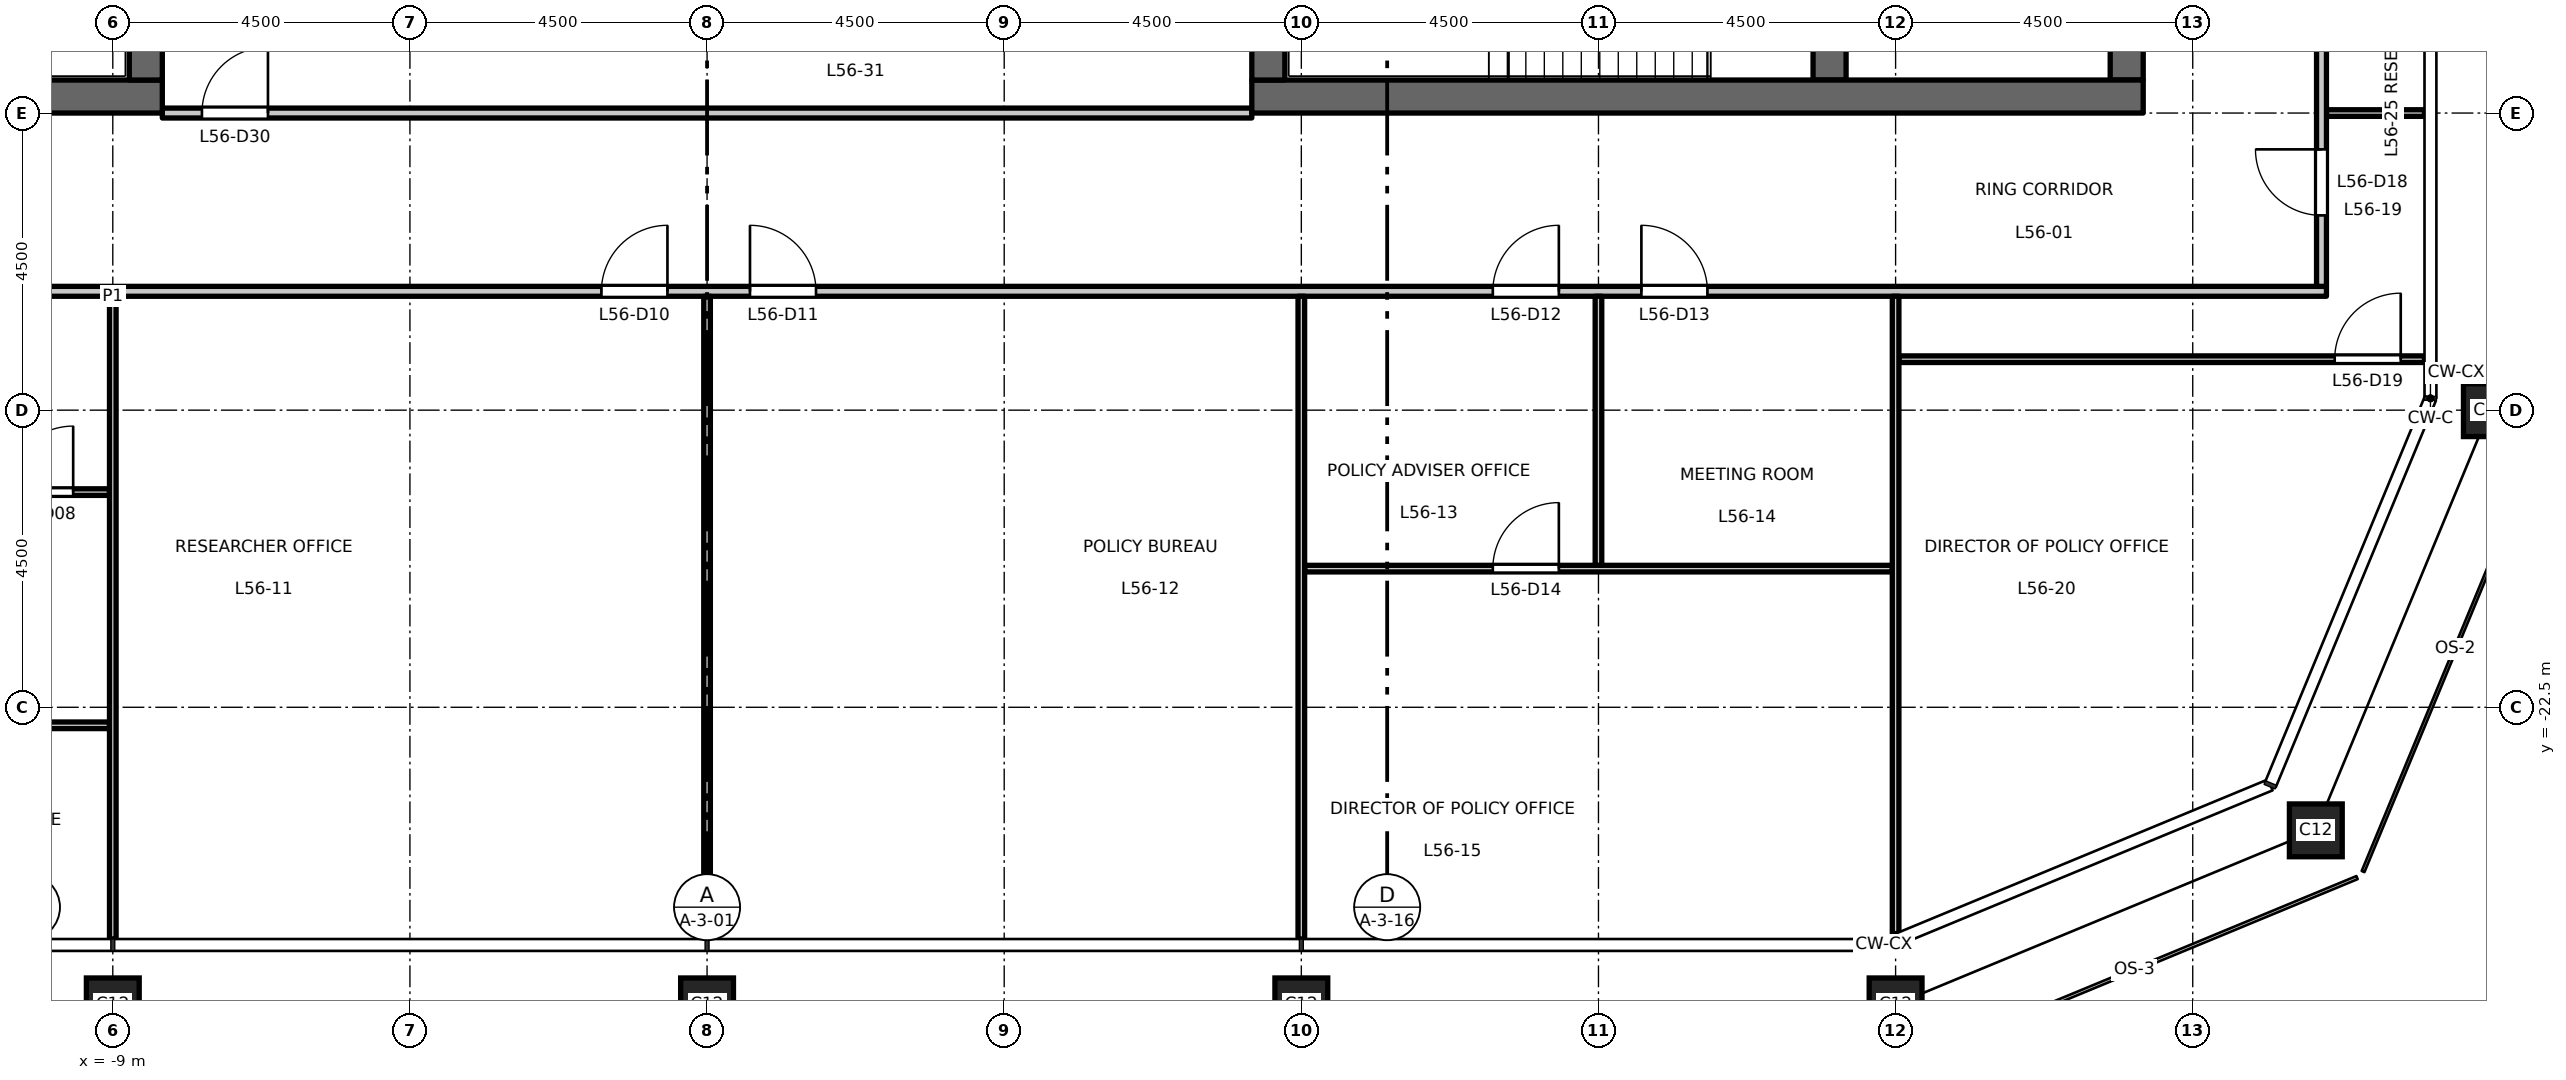
"""IFC4 building model, lengths in metres.
Left out: names, types, materials, properties, quantities, classifications, styles, units other than length and angle.
Written with IfcOpenShell. Run it as: python <this file> out.ifc"""

import sys

from ifc_helpers import new_model, si_unit, direction, frame, frame_2d, origin, origin_2d, place, context, subcontext, project, spatial, rectangle, hollow_rectangle, extrude, element, fill, save


model = new_model("IFC4")
c1 = context("Model", 3, precision=1e-05, world=origin(), true_north=direction((0.0, 1.0)))
c2 = subcontext(c1, "Body", "Model", "MODEL_VIEW")
j1 = project(units=[si_unit("LENGTHUNIT", "METRE"), si_unit("PLANEANGLEUNIT", "RADIAN")], contexts=[c1])
p1 = place(None, origin())
s1 = spatial("IfcSite", under=j1, at=p1, CompositionType="ELEMENT")
p2 = place(p1, origin())
s2 = spatial("IfcBuilding", under=s1, at=p2, CompositionType="ELEMENT")
p3 = place(p2, frame((0.0, 0.0, 260.2)))
s3 = spatial("IfcBuildingStorey", under=s2, at=p3, CompositionType="ELEMENT", Elevation=260.2)
for number, where, z_axis, x_axis in (
    (1, (-9.0, -27.0, 0.0), (0.0, 0.0, 1.0), (1.0, 0.0, 0.0)),
    (2, (0.0, -27.0, 0.0), (0.0, 0.0, 1.0), (1.0, 0.0, 0.0)),
    (3, (9.0, -27.0, 0.0), (0.0, 0.0, 1.0), (1.0, 0.0, 0.0)),
    (4, (18.0, -27.0, 0.0), (0.0, 0.0, 1.0), (1.0, 0.0, 0.0)),
    (5, (24.364, -24.364, 0.0), (0.0, 0.0, 1.0), (1.0, 0.0, 0.0)),
    (6, (27.0, -18.0, 0.0), (0.0, 0.0, 1.0), (1.0, 0.0, 0.0)),
):
    element("IfcColumn", number, at=place(p3, frame(where, z_axis=z_axis, x_axis=x_axis)), inside=s3, PredefinedType="COLUMN", context=c2, shape_type="SweptSolid", body=[
        extrude(hollow_rectangle(XDim=0.8, YDim=0.8, WallThickness=0.045, at=origin_2d()), origin(), (0.0, 0.0, 1.0), 4.5),
    ])
p4 = place(p3, frame((-8.25, -13.25, 0.0), z_axis=(0.0, 0.0, 1.0), x_axis=(-1.0, 0.0, 0.0)))
e7 = element("IfcWall", 7, at=p4, inside=s3, PredefinedType="SHEAR", context=c2, shape_type="SweptSolid", body=[
    extrude(rectangle(XDim=13.5, YDim=0.5, at=frame_2d((6.75, 0.0))), origin(), (0.0, 0.0, 1.0), 4.35),
])
p5 = place(p3, frame((-8.5, -13.0, 0.0), z_axis=(0.0, 0.0, 1.0), x_axis=(0.0, 1.0, 0.0)))
e8 = element("IfcWall", 8, at=p5, inside=s3, PredefinedType="SHEAR", context=c2, shape_type="SweptSolid", body=[
    extrude(rectangle(XDim=26.0, YDim=0.5, at=frame_2d((13.0, 0.0))), origin(), (0.0, 0.0, 1.0), 4.35),
])
p6 = place(p3, frame((21.5, -13.0, 0.0), z_axis=(0.0, 0.0, 1.0), x_axis=(0.0, 1.0, 0.0)))
e9 = element("IfcWall", 9, at=p6, inside=s3, PredefinedType="SHEAR", context=c2, shape_type="SweptSolid", body=[
    extrude(rectangle(XDim=26.0, YDim=0.5, at=frame_2d((13.0, 0.0))), origin(), (0.0, 0.0, 1.0), 4.35),
])
p7 = place(p6, frame((16.825, 0.0, 0.0)))
e10 = element("IfcOpeningElement", 10, at=p7, cuts=e9, PredefinedType="OPENING", context=c2, shape_type="SweptSolid", body=[
    extrude(rectangle(XDim=1.8, YDim=2.1, at=frame_2d((0.9, 1.05))), frame((0.0, 0.26, 0.0), z_axis=(0.0, -1.0, 0.0), x_axis=(1.0, 0.0, 0.0)), (0.0, 0.0, 1.0), 0.52),
])
p8 = place(p6, frame((7.375, 0.0, 0.0)))
e11 = element("IfcOpeningElement", 11, at=p8, cuts=e9, PredefinedType="OPENING", context=c2, shape_type="SweptSolid", body=[
    extrude(rectangle(XDim=1.8, YDim=2.1, at=frame_2d((0.9, 1.05))), frame((0.0, 0.26, 0.0), z_axis=(0.0, -1.0, 0.0), x_axis=(1.0, 0.0, 0.0)), (0.0, 0.0, 1.0), 0.52),
])
p9 = place(p6, frame((14.125, 0.0, 0.0)))
e12 = element("IfcOpeningElement", 12, at=p9, cuts=e9, PredefinedType="OPENING", context=c2, shape_type="SweptSolid", body=[
    extrude(rectangle(XDim=0.9, YDim=2.1, at=frame_2d((0.45, 1.05))), frame((0.0, 0.26, 0.0), z_axis=(0.0, -1.0, 0.0), x_axis=(1.0, 0.0, 0.0)), (0.0, 0.0, 1.0), 0.52),
])
p10 = place(p3, frame((17.0, -13.0, 0.0), z_axis=(0.0, 0.0, 1.0), x_axis=(0.0, 1.0, 0.0)))
e13 = element("IfcWall", 13, at=p10, inside=s3, PredefinedType="SHEAR", context=c2, shape_type="SweptSolid", body=[
    extrude(rectangle(XDim=6.575, YDim=0.5, at=frame_2d((3.288, 0.0))), origin(), (0.0, 0.0, 1.0), 4.35),
])
p11 = place(p3, frame((8.25, -13.25, 0.0), z_axis=(0.0, 0.0, 1.0), x_axis=(1.0, 0.0, 0.0)))
e14 = element("IfcWall", 14, at=p11, inside=s3, PredefinedType="SHEAR", context=c2, shape_type="SweptSolid", body=[
    extrude(rectangle(XDim=13.5, YDim=0.5, at=frame_2d((6.75, 0.0))), origin(), (0.0, 0.0, 1.0), 4.35),
])
p12 = place(p3, frame((8.5, -13.0, 0.0), z_axis=(0.0, 0.0, 1.0), x_axis=(0.0, 1.0, 0.0)))
e15 = element("IfcWall", 15, at=p12, inside=s3, PredefinedType="SHEAR", context=c2, shape_type="SweptSolid", body=[
    extrude(rectangle(XDim=26.0, YDim=0.5, at=frame_2d((13.0, 0.0))), origin(), (0.0, 0.0, 1.0), 4.35),
])
p13 = place(p3, frame((-17.95, -22.773, 0.0), z_axis=(0.0, 0.0, 1.0), x_axis=(1.0, 0.0, 0.0)))
e16 = element("IfcWall", 16, at=p13, inside=s3, PredefinedType="PARTITIONING", context=c2, shape_type="SweptSolid", body=[
    extrude(rectangle(XDim=8.9, YDim=0.1, at=frame_2d((4.45, 0.0))), origin(), (0.0, 0.0, 1.0), 4.35),
])
p14 = place(p13, frame((0.6, 0.0, 0.0)))
e17 = element("IfcOpeningElement", 17, at=p14, cuts=e16, PredefinedType="OPENING", context=c2, shape_type="SweptSolid", body=[
    extrude(rectangle(XDim=1.0, YDim=2.1, at=frame_2d((0.5, 1.05))), frame((0.0, 0.06, 0.0), z_axis=(0.0, -1.0, 0.0), x_axis=(1.0, 0.0, 0.0)), (0.0, 0.0, 1.0), 0.12),
])
p15 = place(p3, frame((9.05, -20.4, 0.0), z_axis=(0.0, 0.0, 1.0), x_axis=(1.0, 0.0, 0.0)))
e18 = element("IfcWall", 18, at=p15, inside=s3, PredefinedType="PARTITIONING", context=c2, shape_type="SweptSolid", body=[
    extrude(rectangle(XDim=8.9, YDim=0.1, at=frame_2d((4.45, 0.0))), origin(), (0.0, 0.0, 1.0), 4.35),
])
p16 = place(p15, frame((2.85, 0.0, 0.0)))
e19 = element("IfcOpeningElement", 19, at=p16, cuts=e18, PredefinedType="OPENING", context=c2, shape_type="SweptSolid", body=[
    extrude(rectangle(XDim=1.0, YDim=2.1, at=frame_2d((0.5, 1.05))), frame((0.0, 0.06, 0.0), z_axis=(0.0, -1.0, 0.0), x_axis=(1.0, 0.0, 0.0)), (0.0, 0.0, 1.0), 0.12),
])
p17 = place(p3, frame((-17.95, -19.241, 0.0), z_axis=(0.0, 0.0, 1.0), x_axis=(1.0, 0.0, 0.0)))
e20 = element("IfcWall", 20, at=p17, inside=s3, PredefinedType="PARTITIONING", context=c2, shape_type="SweptSolid", body=[
    extrude(rectangle(XDim=8.9, YDim=0.1, at=frame_2d((4.45, 0.0))), origin(), (0.0, 0.0, 1.0), 4.35),
])
p18 = place(p17, frame((7.35, 0.0, 0.0)))
e21 = element("IfcOpeningElement", 21, at=p18, cuts=e20, PredefinedType="OPENING", context=c2, shape_type="SweptSolid", body=[
    extrude(rectangle(XDim=1.0, YDim=2.1, at=frame_2d((0.5, 1.05))), frame((0.0, 0.06, 0.0), z_axis=(0.0, -1.0, 0.0), x_axis=(1.0, 0.0, 0.0)), (0.0, 0.0, 1.0), 0.12),
])
p19 = place(p3, frame((18.05, -17.228, 0.0), z_axis=(0.0, 0.0, 1.0), x_axis=(1.0, 0.0, 0.0)))
e22 = element("IfcWall", 22, at=p19, inside=s3, PredefinedType="PARTITIONING", context=c2, shape_type="SweptSolid", body=[
    extrude(rectangle(XDim=7.96, YDim=0.1, at=frame_2d((3.98, 0.0))), origin(), (0.0, 0.0, 1.0), 4.35),
])
p20 = place(p19, frame((6.6, 0.0, 0.0)))
e23 = element("IfcOpeningElement", 23, at=p20, cuts=e22, PredefinedType="OPENING", context=c2, shape_type="SweptSolid", body=[
    extrude(rectangle(XDim=1.0, YDim=2.1, at=frame_2d((0.5, 1.05))), frame((0.0, 0.06, 0.0), z_axis=(0.0, -1.0, 0.0), x_axis=(1.0, 0.0, 0.0)), (0.0, 0.0, 1.0), 0.12),
])
p21 = place(p3, frame((-24.525, -16.2, 0.0), z_axis=(0.0, 0.0, 1.0), x_axis=(1.0, 0.0, 0.0)))
e24 = element("IfcWall", 24, at=p21, inside=s3, PredefinedType="PARTITIONING", context=c2, shape_type="SweptSolid", body=[
    extrude(rectangle(XDim=49.05, YDim=0.15, at=frame_2d((24.525, 0.0))), origin(), (0.0, 0.0, 1.0), 4.35),
])
p22 = place(p21, frame((7.175, 0.0, 0.0)))
e25 = element("IfcOpeningElement", 25, at=p22, cuts=e24, PredefinedType="OPENING", context=c2, shape_type="SweptSolid", body=[
    extrude(rectangle(XDim=1.0, YDim=2.1, at=frame_2d((0.5, 1.05))), frame((0.0, 0.085, 0.0), z_axis=(0.0, -1.0, 0.0), x_axis=(1.0, 0.0, 0.0)), (0.0, 0.0, 1.0), 0.17),
])
p23 = place(p21, frame((22.925, 0.0, 0.0)))
e26 = element("IfcOpeningElement", 26, at=p23, cuts=e24, PredefinedType="OPENING", context=c2, shape_type="SweptSolid", body=[
    extrude(rectangle(XDim=1.0, YDim=2.1, at=frame_2d((0.5, 1.05))), frame((0.0, 0.085, 0.0), z_axis=(0.0, -1.0, 0.0), x_axis=(1.0, 0.0, 0.0)), (0.0, 0.0, 1.0), 0.17),
])
p24 = place(p21, frame((25.175, 0.0, 0.0)))
e27 = element("IfcOpeningElement", 27, at=p24, cuts=e24, PredefinedType="OPENING", context=c2, shape_type="SweptSolid", body=[
    extrude(rectangle(XDim=1.0, YDim=2.1, at=frame_2d((0.5, 1.05))), frame((0.0, 0.085, 0.0), z_axis=(0.0, -1.0, 0.0), x_axis=(1.0, 0.0, 0.0)), (0.0, 0.0, 1.0), 0.17),
])
p25 = place(p21, frame((36.425, 0.0, 0.0)))
e28 = element("IfcOpeningElement", 28, at=p25, cuts=e24, PredefinedType="OPENING", context=c2, shape_type="SweptSolid", body=[
    extrude(rectangle(XDim=1.0, YDim=2.1, at=frame_2d((0.5, 1.05))), frame((0.0, 0.085, 0.0), z_axis=(0.0, -1.0, 0.0), x_axis=(1.0, 0.0, 0.0)), (0.0, 0.0, 1.0), 0.17),
])
p26 = place(p21, frame((38.675, 0.0, 0.0)))
e29 = element("IfcOpeningElement", 29, at=p26, cuts=e24, PredefinedType="OPENING", context=c2, shape_type="SweptSolid", body=[
    extrude(rectangle(XDim=1.0, YDim=2.1, at=frame_2d((0.5, 1.05))), frame((0.0, 0.085, 0.0), z_axis=(0.0, -1.0, 0.0), x_axis=(1.0, 0.0, 0.0)), (0.0, 0.0, 1.0), 0.17),
])
p27 = place(p21, frame((0.725, 0.0, 0.0)))
e30 = element("IfcOpeningElement", 30, at=p27, cuts=e24, PredefinedType="OPENING", context=c2, shape_type="SweptSolid", body=[
    extrude(rectangle(XDim=1.0, YDim=2.1, at=frame_2d((0.5, 1.05))), frame((0.0, 0.085, 0.0), z_axis=(0.0, -1.0, 0.0), x_axis=(1.0, 0.0, 0.0)), (0.0, 0.0, 1.0), 0.17),
])
p28 = place(p3, frame((24.525, -13.5, 0.0), z_axis=(0.0, 0.0, 1.0), x_axis=(1.0, 0.0, 0.0)))
e31 = element("IfcWall", 31, at=p28, inside=s3, PredefinedType="PARTITIONING", context=c2, shape_type="SweptSolid", body=[
    extrude(rectangle(XDim=1.485, YDim=0.1, at=frame_2d((0.743, 0.0))), origin(), (0.0, 0.0, 1.0), 3.95),
])
p29 = place(p3, frame((-8.25, -13.5, 0.0), z_axis=(0.0, 0.0, 1.0), x_axis=(1.0, 0.0, 0.0)))
e32 = element("IfcWall", 32, at=p29, inside=s3, PredefinedType="PARTITIONING", context=c2, shape_type="SweptSolid", body=[
    extrude(rectangle(XDim=16.5, YDim=0.15, at=frame_2d((8.25, 0.0))), origin(), (0.0, 0.0, 1.0), 3.95),
])
p30 = place(p29, frame((0.6, 0.0, 0.0)))
e33 = element("IfcOpeningElement", 33, at=p30, cuts=e32, PredefinedType="OPENING", context=c2, shape_type="SweptSolid", body=[
    extrude(rectangle(XDim=1.0, YDim=2.1, at=frame_2d((0.5, 1.05))), frame((0.0, 0.085, 0.0), z_axis=(0.0, -1.0, 0.0), x_axis=(1.0, 0.0, 0.0)), (0.0, 0.0, 1.0), 0.17),
])
p31 = place(p3, frame((-9.0, -26.01, 0.0), z_axis=(0.0, 0.0, 1.0), x_axis=(0.0, 1.0, 0.0)))
e34 = element("IfcWall", 34, at=p31, inside=s3, PredefinedType="PARTITIONING", context=c2, shape_type="SweptSolid", body=[
    extrude(rectangle(XDim=9.735, YDim=0.1, at=frame_2d((4.868, 0.0))), origin(), (0.0, 0.0, 1.0), 3.65),
])
p32 = place(p3, frame((0.0, -26.01, 0.0), z_axis=(0.0, 0.0, 1.0), x_axis=(0.0, 1.0, 0.0)))
e35 = element("IfcWall", 35, at=p32, inside=s3, PredefinedType="PARTITIONING", context=c2, shape_type="SweptSolid", body=[
    extrude(rectangle(XDim=9.735, YDim=0.1, at=frame_2d((4.868, 0.0))), origin(), (0.0, 0.0, 1.0), 3.55),
])
p33 = place(p3, frame((9.0, -26.01, 0.0), z_axis=(0.0, 0.0, 1.0), x_axis=(0.0, 1.0, 0.0)))
e36 = element("IfcWall", 36, at=p33, inside=s3, PredefinedType="PARTITIONING", context=c2, shape_type="SweptSolid", body=[
    extrude(rectangle(XDim=9.735, YDim=0.1, at=frame_2d((4.868, 0.0))), origin(), (0.0, 0.0, 1.0), 3.65),
])
p34 = place(p3, frame((13.5, -20.35, 0.0), z_axis=(0.0, 0.0, 1.0), x_axis=(0.0, 1.0, 0.0)))
e37 = element("IfcWall", 37, at=p34, inside=s3, PredefinedType="PARTITIONING", context=c2, shape_type="SweptSolid", body=[
    extrude(rectangle(XDim=4.075, YDim=0.1, at=frame_2d((2.038, 0.0))), origin(), (0.0, 0.0, 1.0), 4.35),
])
p35 = place(p3, frame((18.0, -25.928, 0.0), z_axis=(0.0, 0.0, 1.0), x_axis=(0.0, 1.0, 0.0)))
e38 = element("IfcWall", 38, at=p35, inside=s3, PredefinedType="PARTITIONING", context=c2, shape_type="SweptSolid", body=[
    extrude(rectangle(XDim=9.653, YDim=0.1, at=frame_2d((4.827, 0.0))), origin(), (0.0, 0.0, 1.0), 3.65),
])
p36 = place(p3, frame((24.45, -16.125, 0.0), z_axis=(0.0, 0.0, 1.0), x_axis=(0.0, 1.0, 0.0)))
e39 = element("IfcWall", 39, at=p36, inside=s3, PredefinedType="PARTITIONING", context=c2, shape_type="SweptSolid", body=[
    extrude(rectangle(XDim=32.25, YDim=0.15, at=frame_2d((16.125, 0.0))), origin(), (0.0, 0.0, 1.0), 4.35),
])
p37 = place(p36, frame((1.075, 0.0, 0.0)))
e40 = element("IfcOpeningElement", 40, at=p37, cuts=e39, PredefinedType="OPENING", context=c2, shape_type="SweptSolid", body=[
    extrude(rectangle(XDim=1.0, YDim=2.1, at=frame_2d((0.5, 1.05))), frame((0.0, 0.085, 0.0), z_axis=(0.0, -1.0, 0.0), x_axis=(1.0, 0.0, 0.0)), (0.0, 0.0, 1.0), 0.17),
])
p38 = place(p36, frame((5.525, 0.0, 0.0)))
e41 = element("IfcOpeningElement", 41, at=p38, cuts=e39, PredefinedType="OPENING", context=c2, shape_type="SweptSolid", body=[
    extrude(rectangle(XDim=1.0, YDim=2.1, at=frame_2d((0.5, 1.05))), frame((0.0, 0.085, 0.0), z_axis=(0.0, -1.0, 0.0), x_axis=(1.0, 0.0, 0.0)), (0.0, 0.0, 1.0), 0.17),
])
p39 = place(p36, frame((7.775, 0.0, 0.0)))
e42 = element("IfcOpeningElement", 42, at=p39, cuts=e39, PredefinedType="OPENING", context=c2, shape_type="SweptSolid", body=[
    extrude(rectangle(XDim=1.0, YDim=2.1, at=frame_2d((0.5, 1.05))), frame((0.0, 0.085, 0.0), z_axis=(0.0, -1.0, 0.0), x_axis=(1.0, 0.0, 0.0)), (0.0, 0.0, 1.0), 0.17),
])
p40 = place(p36, frame((23.525, 0.0, 0.0)))
e43 = element("IfcOpeningElement", 43, at=p40, cuts=e39, PredefinedType="OPENING", context=c2, shape_type="SweptSolid", body=[
    extrude(rectangle(XDim=1.0, YDim=2.1, at=frame_2d((0.5, 1.05))), frame((0.0, 0.085, 0.0), z_axis=(0.0, -1.0, 0.0), x_axis=(1.0, 0.0, 0.0)), (0.0, 0.0, 1.0), 0.17),
])
p41 = place(p36, frame((25.775, 0.0, 0.0)))
e44 = element("IfcOpeningElement", 44, at=p41, cuts=e39, PredefinedType="OPENING", context=c2, shape_type="SweptSolid", body=[
    extrude(rectangle(XDim=1.0, YDim=2.1, at=frame_2d((0.5, 1.05))), frame((0.0, 0.085, 0.0), z_axis=(0.0, -1.0, 0.0), x_axis=(1.0, 0.0, 0.0)), (0.0, 0.0, 1.0), 0.17),
])
p42 = place(p18, origin())
e45 = element("IfcDoor", 45, at=p42, inside=s3, OperationType="SINGLE_SWING_RIGHT", PredefinedType="DOOR", context=c2, shape_type="SweptSolid", body=[
    extrude(rectangle(XDim=1.0, YDim=2.1, at=frame_2d((0.5, 1.05))), frame((0.0, 0.025, 0.0), z_axis=(0.0, -1.0, 0.0), x_axis=(1.0, 0.0, 0.0)), (0.0, 0.0, 1.0), 0.05),
])
fill(e21, e45)
p43 = place(p23, origin())
e46 = element("IfcDoor", 46, at=p43, inside=s3, OperationType="SINGLE_SWING_RIGHT", PredefinedType="DOOR", context=c2, shape_type="SweptSolid", body=[
    extrude(rectangle(XDim=1.0, YDim=2.1, at=frame_2d((0.5, 1.05))), frame((0.0, 0.025, 0.0), z_axis=(0.0, -1.0, 0.0), x_axis=(1.0, 0.0, 0.0)), (0.0, 0.0, 1.0), 0.05),
])
fill(e26, e46)
p44 = place(p24, origin())
e47 = element("IfcDoor", 47, at=p44, inside=s3, OperationType="SINGLE_SWING_LEFT", PredefinedType="DOOR", context=c2, shape_type="SweptSolid", body=[
    extrude(rectangle(XDim=1.0, YDim=2.1, at=frame_2d((0.5, 1.05))), frame((0.0, 0.025, 0.0), z_axis=(0.0, -1.0, 0.0), x_axis=(1.0, 0.0, 0.0)), (0.0, 0.0, 1.0), 0.05),
])
fill(e27, e47)
p45 = place(p25, origin())
e48 = element("IfcDoor", 48, at=p45, inside=s3, OperationType="SINGLE_SWING_RIGHT", PredefinedType="DOOR", context=c2, shape_type="SweptSolid", body=[
    extrude(rectangle(XDim=1.0, YDim=2.1, at=frame_2d((0.5, 1.05))), frame((0.0, 0.025, 0.0), z_axis=(0.0, -1.0, 0.0), x_axis=(1.0, 0.0, 0.0)), (0.0, 0.0, 1.0), 0.05),
])
fill(e28, e48)
p46 = place(p26, origin())
e49 = element("IfcDoor", 49, at=p46, inside=s3, OperationType="SINGLE_SWING_LEFT", PredefinedType="DOOR", context=c2, shape_type="SweptSolid", body=[
    extrude(rectangle(XDim=1.0, YDim=2.1, at=frame_2d((0.5, 1.05))), frame((0.0, 0.025, 0.0), z_axis=(0.0, -1.0, 0.0), x_axis=(1.0, 0.0, 0.0)), (0.0, 0.0, 1.0), 0.05),
])
fill(e29, e49)
p47 = place(p16, origin())
e50 = element("IfcDoor", 50, at=p47, inside=s3, OperationType="SINGLE_SWING_RIGHT", PredefinedType="DOOR", context=c2, shape_type="SweptSolid", body=[
    extrude(rectangle(XDim=1.0, YDim=2.1, at=frame_2d((0.5, 1.05))), frame((0.0, 0.025, 0.0), z_axis=(0.0, -1.0, 0.0), x_axis=(1.0, 0.0, 0.0)), (0.0, 0.0, 1.0), 0.05),
])
fill(e19, e50)
p48 = place(p37, origin())
e51 = element("IfcDoor", 51, at=p48, inside=s3, OperationType="SINGLE_SWING_RIGHT", PredefinedType="DOOR", context=c2, shape_type="SweptSolid", body=[
    extrude(rectangle(XDim=1.0, YDim=2.1, at=frame_2d((0.5, 1.05))), frame((0.0, 0.025, 0.0), z_axis=(0.0, -1.0, 0.0), x_axis=(1.0, 0.0, 0.0)), (0.0, 0.0, 1.0), 0.05),
])
fill(e40, e51)
p49 = place(p20, origin())
e52 = element("IfcDoor", 52, at=p49, inside=s3, OperationType="SINGLE_SWING_RIGHT", PredefinedType="DOOR", context=c2, shape_type="SweptSolid", body=[
    extrude(rectangle(XDim=1.0, YDim=2.1, at=frame_2d((0.5, 1.05))), frame((0.0, 0.025, 0.0), z_axis=(0.0, -1.0, 0.0), x_axis=(1.0, 0.0, 0.0)), (0.0, 0.0, 1.0), 0.05),
])
fill(e23, e52)
p50 = place(p30, origin())
e53 = element("IfcDoor", 53, at=p50, inside=s3, OperationType="SINGLE_SWING_RIGHT", PredefinedType="DOOR", context=c2, shape_type="SweptSolid", body=[
    extrude(rectangle(XDim=1.0, YDim=2.1, at=frame_2d((0.5, 1.05))), frame((0.0, 0.025, 0.0), z_axis=(0.0, -1.0, 0.0), x_axis=(1.0, 0.0, 0.0)), (0.0, 0.0, 1.0), 0.05),
])
fill(e33, e53)
save(model, sys.argv[1])
